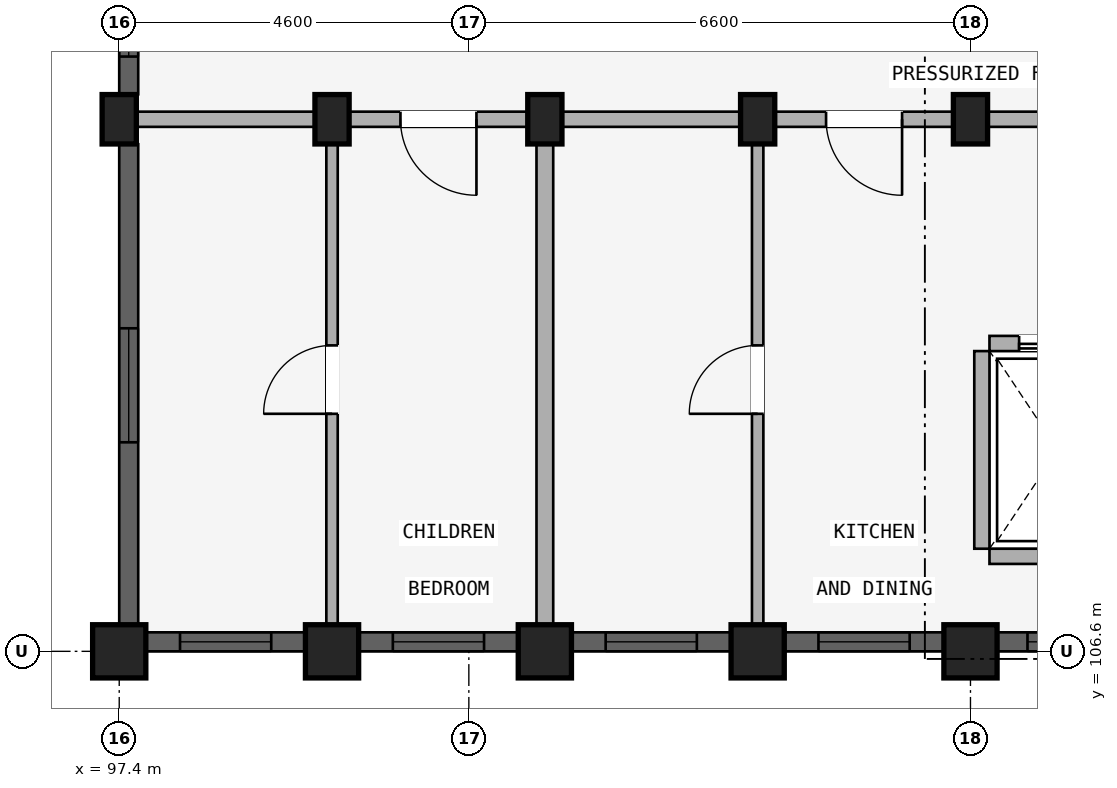
"""IFC4 building model, lengths in metres.
Left out: names, types, materials, properties, quantities, classifications, styles, units other than length and angle.
Written with IfcOpenShell. Run it as: python <this file> out.ifc"""

import sys

from ifc_helpers import new_model, si_unit, direction, frame, frame_2d, origin, origin_2d, place, context, subcontext, project, spatial, rectangle, extrude, element, fill, save


model = new_model("IFC4")
c1 = context("Model", 3, precision=1e-05, world=origin(), true_north=direction((0.0, 1.0)))
c2 = subcontext(c1, "Body", "Model", "MODEL_VIEW")
j1 = project(units=[si_unit("LENGTHUNIT", "METRE"), si_unit("PLANEANGLEUNIT", "RADIAN")], contexts=[c1])
p1 = place(None, origin())
s1 = spatial("IfcSite", under=j1, at=p1, CompositionType="ELEMENT")
p2 = place(p1, origin())
s2 = spatial("IfcBuilding", under=s1, at=p2, CompositionType="ELEMENT")
p3 = place(p2, frame((0.0, 0.0, 27.6)))
s3 = spatial("IfcBuildingStorey", under=s2, at=p3, CompositionType="ELEMENT", Elevation=27.6)
p4 = place(p3, frame((108.6, 106.6, 0.0), z_axis=(0.0, 0.0, 1.0), x_axis=(1.0, 0.0, 0.0)))
e1 = element("IfcColumn", 1, at=p4, inside=s3, PredefinedType="COLUMN", context=c2, shape_type="SweptSolid", body=[
    extrude(rectangle(XDim=0.7, YDim=0.7, at=origin_2d()), origin(), (0.0, 0.0, 1.0), 2.93),
])
p5 = place(p3, frame((108.6, 113.6, 0.0), z_axis=(0.0, 0.0, 1.0), x_axis=(1.0, 0.0, 0.0)))
e2 = element("IfcColumn", 2, at=p5, inside=s3, PredefinedType="COLUMN", context=c2, shape_type="SweptSolid", body=[
    extrude(rectangle(XDim=0.45, YDim=0.65, at=origin_2d()), origin(), (0.0, 0.0, 1.0), 2.93),
])
p6 = place(p3, frame((105.8, 106.6, 0.0), z_axis=(0.0, 0.0, 1.0), x_axis=(1.0, 0.0, 0.0)))
e3 = element("IfcColumn", 3, at=p6, inside=s3, PredefinedType="COLUMN", context=c2, shape_type="SweptSolid", body=[
    extrude(rectangle(XDim=0.7, YDim=0.7, at=origin_2d()), origin(), (0.0, 0.0, 1.0), 2.93),
])
p7 = place(p3, frame((105.8, 113.6, 0.0), z_axis=(0.0, 0.0, 1.0), x_axis=(1.0, 0.0, 0.0)))
e4 = element("IfcColumn", 4, at=p7, inside=s3, PredefinedType="COLUMN", context=c2, shape_type="SweptSolid", body=[
    extrude(rectangle(XDim=0.45, YDim=0.65, at=origin_2d()), origin(), (0.0, 0.0, 1.0), 2.93),
])
p8 = place(p3, frame((103.0, 106.6, 0.0), z_axis=(0.0, 0.0, 1.0), x_axis=(1.0, 0.0, 0.0)))
e5 = element("IfcColumn", 5, at=p8, inside=s3, PredefinedType="COLUMN", context=c2, shape_type="SweptSolid", body=[
    extrude(rectangle(XDim=0.7, YDim=0.7, at=origin_2d()), origin(), (0.0, 0.0, 1.0), 2.93),
])
p9 = place(p3, frame((103.0, 113.6, 0.0), z_axis=(0.0, 0.0, 1.0), x_axis=(1.0, 0.0, 0.0)))
e6 = element("IfcColumn", 6, at=p9, inside=s3, PredefinedType="COLUMN", context=c2, shape_type="SweptSolid", body=[
    extrude(rectangle(XDim=0.45, YDim=0.65, at=origin_2d()), origin(), (0.0, 0.0, 1.0), 2.93),
])
p10 = place(p3, frame((100.2, 106.6, 0.0), z_axis=(0.0, 0.0, 1.0), x_axis=(1.0, 0.0, 0.0)))
e7 = element("IfcColumn", 7, at=p10, inside=s3, PredefinedType="COLUMN", context=c2, shape_type="SweptSolid", body=[
    extrude(rectangle(XDim=0.7, YDim=0.7, at=origin_2d()), origin(), (0.0, 0.0, 1.0), 2.93),
])
p11 = place(p3, frame((100.2, 113.6, 0.0), z_axis=(0.0, 0.0, 1.0), x_axis=(1.0, 0.0, 0.0)))
e8 = element("IfcColumn", 8, at=p11, inside=s3, PredefinedType="COLUMN", context=c2, shape_type="SweptSolid", body=[
    extrude(rectangle(XDim=0.45, YDim=0.65, at=origin_2d()), origin(), (0.0, 0.0, 1.0), 2.93),
])
p12 = place(p3, frame((97.4, 106.6, 0.0), z_axis=(0.0, 0.0, 1.0), x_axis=(1.0, 0.0, 0.0)))
e9 = element("IfcColumn", 9, at=p12, inside=s3, PredefinedType="COLUMN", context=c2, shape_type="SweptSolid", body=[
    extrude(rectangle(XDim=0.7, YDim=0.7, at=origin_2d()), origin(), (0.0, 0.0, 1.0), 2.93),
])
p13 = place(p3, frame((97.4, 113.6, 0.0), z_axis=(0.0, 0.0, 1.0), x_axis=(1.0, 0.0, 0.0)))
e10 = element("IfcColumn", 10, at=p13, inside=s3, PredefinedType="COLUMN", context=c2, shape_type="SweptSolid", body=[
    extrude(rectangle(XDim=0.45, YDim=0.65, at=origin_2d()), origin(), (0.0, 0.0, 1.0), 2.93),
])
p14 = place(p3, frame((108.75, 107.95, 0.0), z_axis=(0.0, 0.0, 1.0), x_axis=(0.0, 1.0, 0.0)))
e11 = element("IfcWall", 11, at=p14, inside=s3, PredefinedType="STANDARD", context=c2, shape_type="SweptSolid", body=[
    extrude(rectangle(XDim=2.6, YDim=0.2, at=frame_2d((1.3, 0.0))), origin(), (0.0, 0.0, 1.0), 2.372),
])
p15 = place(p3, frame((110.65, 107.85, 0.0), z_axis=(0.0, 0.0, 1.0), x_axis=(-1.0, 0.0, 0.0)))
e12 = element("IfcWall", 12, at=p15, inside=s3, PredefinedType="STANDARD", context=c2, shape_type="SweptSolid", body=[
    extrude(rectangle(XDim=1.8, YDim=0.2, at=frame_2d((0.9, 0.0))), origin(), (0.0, 0.0, 1.0), 2.93),
])
p16 = place(p3, frame((110.65, 110.65, 0.0), z_axis=(0.0, 0.0, 1.0), x_axis=(-1.0, 0.0, 0.0)))
e13 = element("IfcWall", 13, at=p16, inside=s3, PredefinedType="STANDARD", context=c2, shape_type="SweptSolid", body=[
    extrude(rectangle(XDim=1.8, YDim=0.2, at=frame_2d((0.9, 0.0))), origin(), (0.0, 0.0, 1.0), 2.93),
])
p17 = place(p16, frame((0.39, 0.0, 0.0)))
e14 = element("IfcOpeningElement", 14, at=p17, cuts=e13, PredefinedType="OPENING", context=c2, shape_type="SweptSolid", body=[
    extrude(rectangle(XDim=1.02, YDim=2.15, at=frame_2d((0.51, 1.075))), frame((0.0, 0.11, 0.0), z_axis=(0.0, -1.0, 0.0), x_axis=(1.0, 0.0, 0.0)), (0.0, 0.0, 1.0), 0.22),
])
p18 = place(p3, frame((114.25, 113.6, 0.0), z_axis=(0.0, 0.0, 1.0), x_axis=(-1.0, 0.0, 0.0)))
e15 = element("IfcWall", 15, at=p18, inside=s3, PredefinedType="STANDARD", context=c2, shape_type="SweptSolid", body=[
    extrude(rectangle(XDim=5.6, YDim=0.2, at=frame_2d((2.8, 0.0))), origin(), (0.0, 0.0, 1.0), 2.372),
])
p19 = place(p18, frame((1.91, 0.0, 0.0)))
e16 = element("IfcOpeningElement", 16, at=p19, cuts=e15, PredefinedType="OPENING", context=c2, shape_type="SweptSolid", body=[
    extrude(rectangle(XDim=1.22, YDim=2.15, at=frame_2d((0.61, 1.075))), frame((0.0, 0.11, 0.0), z_axis=(0.0, -1.0, 0.0), x_axis=(1.0, 0.0, 0.0)), (0.0, 0.0, 1.0), 0.22),
])
p20 = place(p3, frame((108.6, 113.6, 0.0), z_axis=(0.0, 0.0, 1.0), x_axis=(-1.0, 0.0, 0.0)))
e17 = element("IfcWall", 17, at=p20, inside=s3, PredefinedType="STANDARD", context=c2, shape_type="SweptSolid", body=[
    extrude(rectangle(XDim=2.8, YDim=0.2, at=frame_2d((1.4, 0.0))), origin(), (0.0, 0.0, 1.0), 2.372),
])
p21 = place(p20, frame((0.9, 0.0, 0.0)))
e18 = element("IfcOpeningElement", 18, at=p21, cuts=e17, PredefinedType="OPENING", context=c2, shape_type="SweptSolid", body=[
    extrude(rectangle(XDim=1.0, YDim=2.15, at=frame_2d((0.5, 1.075))), frame((0.0, 0.11, 0.0), z_axis=(0.0, -1.0, 0.0), x_axis=(1.0, 0.0, 0.0)), (0.0, 0.0, 1.0), 0.22),
])
p22 = place(p3, frame((105.8, 113.6, 0.0), z_axis=(0.0, 0.0, 1.0), x_axis=(-1.0, 0.0, 0.0)))
e19 = element("IfcWall", 19, at=p22, inside=s3, PredefinedType="STANDARD", context=c2, shape_type="SweptSolid", body=[
    extrude(rectangle(XDim=2.8, YDim=0.2, at=frame_2d((1.4, 0.0))), origin(), (0.0, 0.0, 1.0), 2.372),
])
p23 = place(p3, frame((103.0, 113.6, 0.0), z_axis=(0.0, 0.0, 1.0), x_axis=(-1.0, 0.0, 0.0)))
e20 = element("IfcWall", 20, at=p23, inside=s3, PredefinedType="STANDARD", context=c2, shape_type="SweptSolid", body=[
    extrude(rectangle(XDim=2.8, YDim=0.2, at=frame_2d((1.4, 0.0))), origin(), (0.0, 0.0, 1.0), 2.372),
])
p24 = place(p23, frame((0.9, 0.0, 0.0)))
e21 = element("IfcOpeningElement", 21, at=p24, cuts=e20, PredefinedType="OPENING", context=c2, shape_type="SweptSolid", body=[
    extrude(rectangle(XDim=1.0, YDim=2.15, at=frame_2d((0.5, 1.075))), frame((0.0, 0.11, 0.0), z_axis=(0.0, -1.0, 0.0), x_axis=(1.0, 0.0, 0.0)), (0.0, 0.0, 1.0), 0.22),
])
p25 = place(p3, frame((100.2, 113.6, 0.0), z_axis=(0.0, 0.0, 1.0), x_axis=(-1.0, 0.0, 0.0)))
e22 = element("IfcWall", 22, at=p25, inside=s3, PredefinedType="STANDARD", context=c2, shape_type="SweptSolid", body=[
    extrude(rectangle(XDim=2.8, YDim=0.2, at=frame_2d((1.4, 0.0))), origin(), (0.0, 0.0, 1.0), 2.372),
])
p26 = place(p3, frame((105.8, 106.8, 0.0), z_axis=(0.0, 0.0, 1.0), x_axis=(0.0, 1.0, 0.0)))
e23 = element("IfcWall", 23, at=p26, inside=s3, PredefinedType="PARTITIONING", context=c2, shape_type="SweptSolid", body=[
    extrude(rectangle(XDim=6.75, YDim=0.15, at=frame_2d((3.375, 0.0))), origin(), (0.0, 0.0, 1.0), 2.372),
])
p27 = place(p26, frame((2.925, 0.0, 0.0)))
e24 = element("IfcOpeningElement", 24, at=p27, cuts=e23, PredefinedType="OPENING", context=c2, shape_type="SweptSolid", body=[
    extrude(rectangle(XDim=0.9, YDim=2.1, at=frame_2d((0.45, 1.05))), frame((0.0, 0.085, 0.0), z_axis=(0.0, -1.0, 0.0), x_axis=(1.0, 0.0, 0.0)), (0.0, 0.0, 1.0), 0.17),
])
p28 = place(p3, frame((103.0, 106.8, 0.0), z_axis=(0.0, 0.0, 1.0), x_axis=(0.0, 1.0, 0.0)))
e25 = element("IfcWall", 25, at=p28, inside=s3, PredefinedType="STANDARD", context=c2, shape_type="SweptSolid", body=[
    extrude(rectangle(XDim=6.75, YDim=0.22, at=frame_2d((3.375, 0.0))), origin(), (0.0, 0.0, 1.0), 2.372),
])
p29 = place(p3, frame((100.2, 106.8, 0.0), z_axis=(0.0, 0.0, 1.0), x_axis=(0.0, 1.0, 0.0)))
e26 = element("IfcWall", 26, at=p29, inside=s3, PredefinedType="PARTITIONING", context=c2, shape_type="SweptSolid", body=[
    extrude(rectangle(XDim=6.75, YDim=0.15, at=frame_2d((3.375, 0.0))), origin(), (0.0, 0.0, 1.0), 2.372),
])
p30 = place(p29, frame((2.925, 0.0, 0.0)))
e27 = element("IfcOpeningElement", 27, at=p30, cuts=e26, PredefinedType="OPENING", context=c2, shape_type="SweptSolid", body=[
    extrude(rectangle(XDim=0.9, YDim=2.1, at=frame_2d((0.45, 1.05))), frame((0.0, 0.085, 0.0), z_axis=(0.0, -1.0, 0.0), x_axis=(1.0, 0.0, 0.0)), (0.0, 0.0, 1.0), 0.17),
])
p31 = place(p3, frame((111.372, 106.725, 0.0), z_axis=(0.0, 0.0, 1.0), x_axis=(-1.0, 0.0, 0.0)))
e28 = element("IfcWall", 28, at=p31, inside=s3, PredefinedType="STANDARD", context=c2, shape_type="SweptSolid", body=[
    extrude(rectangle(XDim=2.422, YDim=0.25, at=frame_2d((1.211, 0.0))), origin(), (0.0, 0.0, 1.0), 2.472),
])
p32 = place(p31, frame((0.822, 0.0, 0.772)))
e29 = element("IfcOpeningElement", 29, at=p32, cuts=e28, PredefinedType="OPENING", context=c2, shape_type="SweptSolid", body=[
    extrude(rectangle(XDim=1.2, YDim=1.5, at=frame_2d((0.6, 0.75))), frame((0.0, 0.135, 0.0), z_axis=(0.0, -1.0, 0.0), x_axis=(1.0, 0.0, 0.0)), (0.0, 0.0, 1.0), 0.27),
])
p33 = place(p3, frame((108.247, 106.725, 0.0), z_axis=(0.0, 0.0, 1.0), x_axis=(-1.0, 0.0, 0.0)))
e30 = element("IfcWall", 30, at=p33, inside=s3, PredefinedType="STANDARD", context=c2, shape_type="SweptSolid", body=[
    extrude(rectangle(XDim=2.093, YDim=0.25, at=frame_2d((1.046, 0.0))), origin(), (0.0, 0.0, 1.0), 2.472),
])
p34 = place(p33, frame((0.447, 0.0, 0.772)))
e31 = element("IfcOpeningElement", 31, at=p34, cuts=e30, PredefinedType="OPENING", context=c2, shape_type="SweptSolid", body=[
    extrude(rectangle(XDim=1.2, YDim=1.5, at=frame_2d((0.6, 0.75))), frame((0.0, 0.135, 0.0), z_axis=(0.0, -1.0, 0.0), x_axis=(1.0, 0.0, 0.0)), (0.0, 0.0, 1.0), 0.27),
])
p35 = place(p3, frame((105.447, 106.725, 0.0), z_axis=(0.0, 0.0, 1.0), x_axis=(-1.0, 0.0, 0.0)))
e32 = element("IfcWall", 32, at=p35, inside=s3, PredefinedType="STANDARD", context=c2, shape_type="SweptSolid", body=[
    extrude(rectangle(XDim=2.093, YDim=0.25, at=frame_2d((1.046, 0.0))), origin(), (0.0, 0.0, 1.0), 2.472),
])
p36 = place(p35, frame((0.447, 0.0, 0.772)))
e33 = element("IfcOpeningElement", 33, at=p36, cuts=e32, PredefinedType="OPENING", context=c2, shape_type="SweptSolid", body=[
    extrude(rectangle(XDim=1.2, YDim=1.5, at=frame_2d((0.6, 0.75))), frame((0.0, 0.135, 0.0), z_axis=(0.0, -1.0, 0.0), x_axis=(1.0, 0.0, 0.0)), (0.0, 0.0, 1.0), 0.27),
])
p37 = place(p3, frame((102.646, 106.725, 0.0), z_axis=(0.0, 0.0, 1.0), x_axis=(-1.0, 0.0, 0.0)))
e34 = element("IfcWall", 34, at=p37, inside=s3, PredefinedType="STANDARD", context=c2, shape_type="SweptSolid", body=[
    extrude(rectangle(XDim=2.093, YDim=0.25, at=frame_2d((1.046, 0.0))), origin(), (0.0, 0.0, 1.0), 2.472),
])
p38 = place(p37, frame((0.447, 0.0, 0.772)))
e35 = element("IfcOpeningElement", 35, at=p38, cuts=e34, PredefinedType="OPENING", context=c2, shape_type="SweptSolid", body=[
    extrude(rectangle(XDim=1.2, YDim=1.5, at=frame_2d((0.6, 0.75))), frame((0.0, 0.135, 0.0), z_axis=(0.0, -1.0, 0.0), x_axis=(1.0, 0.0, 0.0)), (0.0, 0.0, 1.0), 0.27),
])
p39 = place(p3, frame((99.846, 106.725, 0.0), z_axis=(0.0, 0.0, 1.0), x_axis=(-1.0, 0.0, 0.0)))
e36 = element("IfcWall", 36, at=p39, inside=s3, PredefinedType="STANDARD", context=c2, shape_type="SweptSolid", body=[
    extrude(rectangle(XDim=2.093, YDim=0.25, at=frame_2d((1.046, 0.0))), origin(), (0.0, 0.0, 1.0), 2.472),
])
p40 = place(p39, frame((0.447, 0.0, 0.772)))
e37 = element("IfcOpeningElement", 37, at=p40, cuts=e36, PredefinedType="OPENING", context=c2, shape_type="SweptSolid", body=[
    extrude(rectangle(XDim=1.2, YDim=1.5, at=frame_2d((0.6, 0.75))), frame((0.0, 0.135, 0.0), z_axis=(0.0, -1.0, 0.0), x_axis=(1.0, 0.0, 0.0)), (0.0, 0.0, 1.0), 0.27),
])
p41 = place(p3, frame((97.525, 106.954, 0.0), z_axis=(0.0, 0.0, 1.0), x_axis=(0.0, 1.0, 0.0)))
e38 = element("IfcWall", 38, at=p41, inside=s3, PredefinedType="STANDARD", context=c2, shape_type="SweptSolid", body=[
    extrude(rectangle(XDim=6.318, YDim=0.25, at=frame_2d((3.159, 0.0))), origin(), (0.0, 0.0, 1.0), 2.372),
])
p42 = place(p41, frame((2.396, 0.0, 0.522)))
e39 = element("IfcOpeningElement", 39, at=p42, cuts=e38, PredefinedType="OPENING", context=c2, shape_type="SweptSolid", body=[
    extrude(rectangle(XDim=1.5, YDim=1.65, at=frame_2d((0.75, 0.825))), frame((0.0, 0.135, 0.0), z_axis=(0.0, -1.0, 0.0), x_axis=(1.0, 0.0, 0.0)), (0.0, 0.0, 1.0), 0.27),
])
p43 = place(p3, frame((97.525, 113.928, 0.0), z_axis=(0.0, 0.0, 1.0), x_axis=(0.0, 1.0, 0.0)))
e40 = element("IfcWall", 40, at=p43, inside=s3, PredefinedType="STANDARD", context=c2, shape_type="SweptSolid", body=[
    extrude(rectangle(XDim=1.743, YDim=0.25, at=frame_2d((0.872, 0.0))), origin(), (0.0, 0.0, 1.0), 2.372),
])
p44 = place(p43, frame((0.497, 0.0, 0.88)))
e41 = element("IfcOpeningElement", 41, at=p44, cuts=e40, PredefinedType="OPENING", context=c2, shape_type="SweptSolid", body=[
    extrude(rectangle(XDim=0.75, YDim=1.05, at=frame_2d((0.375, 0.525))), frame((0.0, 0.135, 0.0), z_axis=(0.0, -1.0, 0.0), x_axis=(1.0, 0.0, 0.0)), (0.0, 0.0, 1.0), 0.27),
])
p45 = place(p32, origin())
e42 = element("IfcWindow", 42, at=p45, inside=s3, PartitioningType="SINGLE_PANEL", PredefinedType="WINDOW", context=c2, shape_type="SweptSolid", body=[
    extrude(rectangle(XDim=1.2, YDim=1.5, at=frame_2d((0.6, 0.75))), frame((0.0, 0.03, 0.0), z_axis=(0.0, -1.0, 0.0), x_axis=(1.0, 0.0, 0.0)), (0.0, 0.0, 1.0), 0.06),
])
fill(e29, e42)
p46 = place(p34, origin())
e43 = element("IfcWindow", 43, at=p46, inside=s3, PartitioningType="SINGLE_PANEL", PredefinedType="WINDOW", context=c2, shape_type="SweptSolid", body=[
    extrude(rectangle(XDim=1.2, YDim=1.5, at=frame_2d((0.6, 0.75))), frame((0.0, 0.03, 0.0), z_axis=(0.0, -1.0, 0.0), x_axis=(1.0, 0.0, 0.0)), (0.0, 0.0, 1.0), 0.06),
])
fill(e31, e43)
p47 = place(p36, origin())
e44 = element("IfcWindow", 44, at=p47, inside=s3, PartitioningType="SINGLE_PANEL", PredefinedType="WINDOW", context=c2, shape_type="SweptSolid", body=[
    extrude(rectangle(XDim=1.2, YDim=1.5, at=frame_2d((0.6, 0.75))), frame((0.0, 0.03, 0.0), z_axis=(0.0, -1.0, 0.0), x_axis=(1.0, 0.0, 0.0)), (0.0, 0.0, 1.0), 0.06),
])
fill(e33, e44)
p48 = place(p38, origin())
e45 = element("IfcWindow", 45, at=p48, inside=s3, PartitioningType="SINGLE_PANEL", PredefinedType="WINDOW", context=c2, shape_type="SweptSolid", body=[
    extrude(rectangle(XDim=1.2, YDim=1.5, at=frame_2d((0.6, 0.75))), frame((0.0, 0.03, 0.0), z_axis=(0.0, -1.0, 0.0), x_axis=(1.0, 0.0, 0.0)), (0.0, 0.0, 1.0), 0.06),
])
fill(e35, e45)
p49 = place(p40, origin())
e46 = element("IfcWindow", 46, at=p49, inside=s3, PartitioningType="SINGLE_PANEL", PredefinedType="WINDOW", context=c2, shape_type="SweptSolid", body=[
    extrude(rectangle(XDim=1.2, YDim=1.5, at=frame_2d((0.6, 0.75))), frame((0.0, 0.03, 0.0), z_axis=(0.0, -1.0, 0.0), x_axis=(1.0, 0.0, 0.0)), (0.0, 0.0, 1.0), 0.06),
])
fill(e37, e46)
p50 = place(p42, origin())
e47 = element("IfcWindow", 47, at=p50, inside=s3, PartitioningType="DOUBLE_PANEL_VERTICAL", PredefinedType="WINDOW", context=c2, shape_type="SweptSolid", body=[
    extrude(rectangle(XDim=1.5, YDim=1.65, at=frame_2d((0.75, 0.825))), frame((0.0, 0.03, 0.0), z_axis=(0.0, -1.0, 0.0), x_axis=(1.0, 0.0, 0.0)), (0.0, 0.0, 1.0), 0.06),
])
fill(e39, e47)
p51 = place(p44, origin())
e48 = element("IfcWindow", 48, at=p51, inside=s3, PartitioningType="SINGLE_PANEL", PredefinedType="WINDOW", context=c2, shape_type="SweptSolid", body=[
    extrude(rectangle(XDim=0.75, YDim=1.05, at=frame_2d((0.375, 0.525))), frame((0.0, 0.03, 0.0), z_axis=(0.0, -1.0, 0.0), x_axis=(1.0, 0.0, 0.0)), (0.0, 0.0, 1.0), 0.06),
])
fill(e41, e48)
p52 = place(p17, origin())
e49 = element("IfcDoor", 49, at=p52, inside=s3, OperationType="SLIDING_TO_RIGHT", PredefinedType="DOOR", context=c2, shape_type="SweptSolid", body=[
    extrude(rectangle(XDim=1.02, YDim=2.15, at=frame_2d((0.51, 1.075))), frame((0.0, 0.025, 0.0), z_axis=(0.0, -1.0, 0.0), x_axis=(1.0, 0.0, 0.0)), (0.0, 0.0, 1.0), 0.05),
])
fill(e14, e49)
p53 = place(p21, origin())
e50 = element("IfcDoor", 50, at=p53, inside=s3, OperationType="SINGLE_SWING_LEFT", PredefinedType="DOOR", context=c2, shape_type="SweptSolid", body=[
    extrude(rectangle(XDim=1.0, YDim=2.15, at=frame_2d((0.5, 1.075))), frame((0.0, 0.025, 0.0), z_axis=(0.0, -1.0, 0.0), x_axis=(1.0, 0.0, 0.0)), (0.0, 0.0, 1.0), 0.05),
])
fill(e18, e50)
p54 = place(p24, origin())
e51 = element("IfcDoor", 51, at=p54, inside=s3, OperationType="SINGLE_SWING_LEFT", PredefinedType="DOOR", context=c2, shape_type="SweptSolid", body=[
    extrude(rectangle(XDim=1.0, YDim=2.15, at=frame_2d((0.5, 1.075))), frame((0.0, 0.025, 0.0), z_axis=(0.0, -1.0, 0.0), x_axis=(1.0, 0.0, 0.0)), (0.0, 0.0, 1.0), 0.05),
])
fill(e21, e51)
p55 = place(p27, frame((0.9, 0.0, 0.0), z_axis=(0.0, 0.0, 1.0), x_axis=(-1.0, 0.0, 0.0)))
e52 = element("IfcDoor", 52, at=p55, inside=s3, OperationType="SINGLE_SWING_RIGHT", PredefinedType="DOOR", context=c2, shape_type="SweptSolid", body=[
    extrude(rectangle(XDim=0.9, YDim=2.1, at=frame_2d((0.45, 1.05))), frame((0.0, 0.025, 0.0), z_axis=(0.0, -1.0, 0.0), x_axis=(1.0, 0.0, 0.0)), (0.0, 0.0, 1.0), 0.05),
])
fill(e24, e52)
p56 = place(p30, origin())
e53 = element("IfcDoor", 53, at=p56, inside=s3, OperationType="SINGLE_SWING_LEFT", PredefinedType="DOOR", context=c2, shape_type="SweptSolid", body=[
    extrude(rectangle(XDim=0.9, YDim=2.1, at=frame_2d((0.45, 1.05))), frame((0.0, 0.025, 0.0), z_axis=(0.0, -1.0, 0.0), x_axis=(1.0, 0.0, 0.0)), (0.0, 0.0, 1.0), 0.05),
])
fill(e27, e53)
save(model, sys.argv[1])
